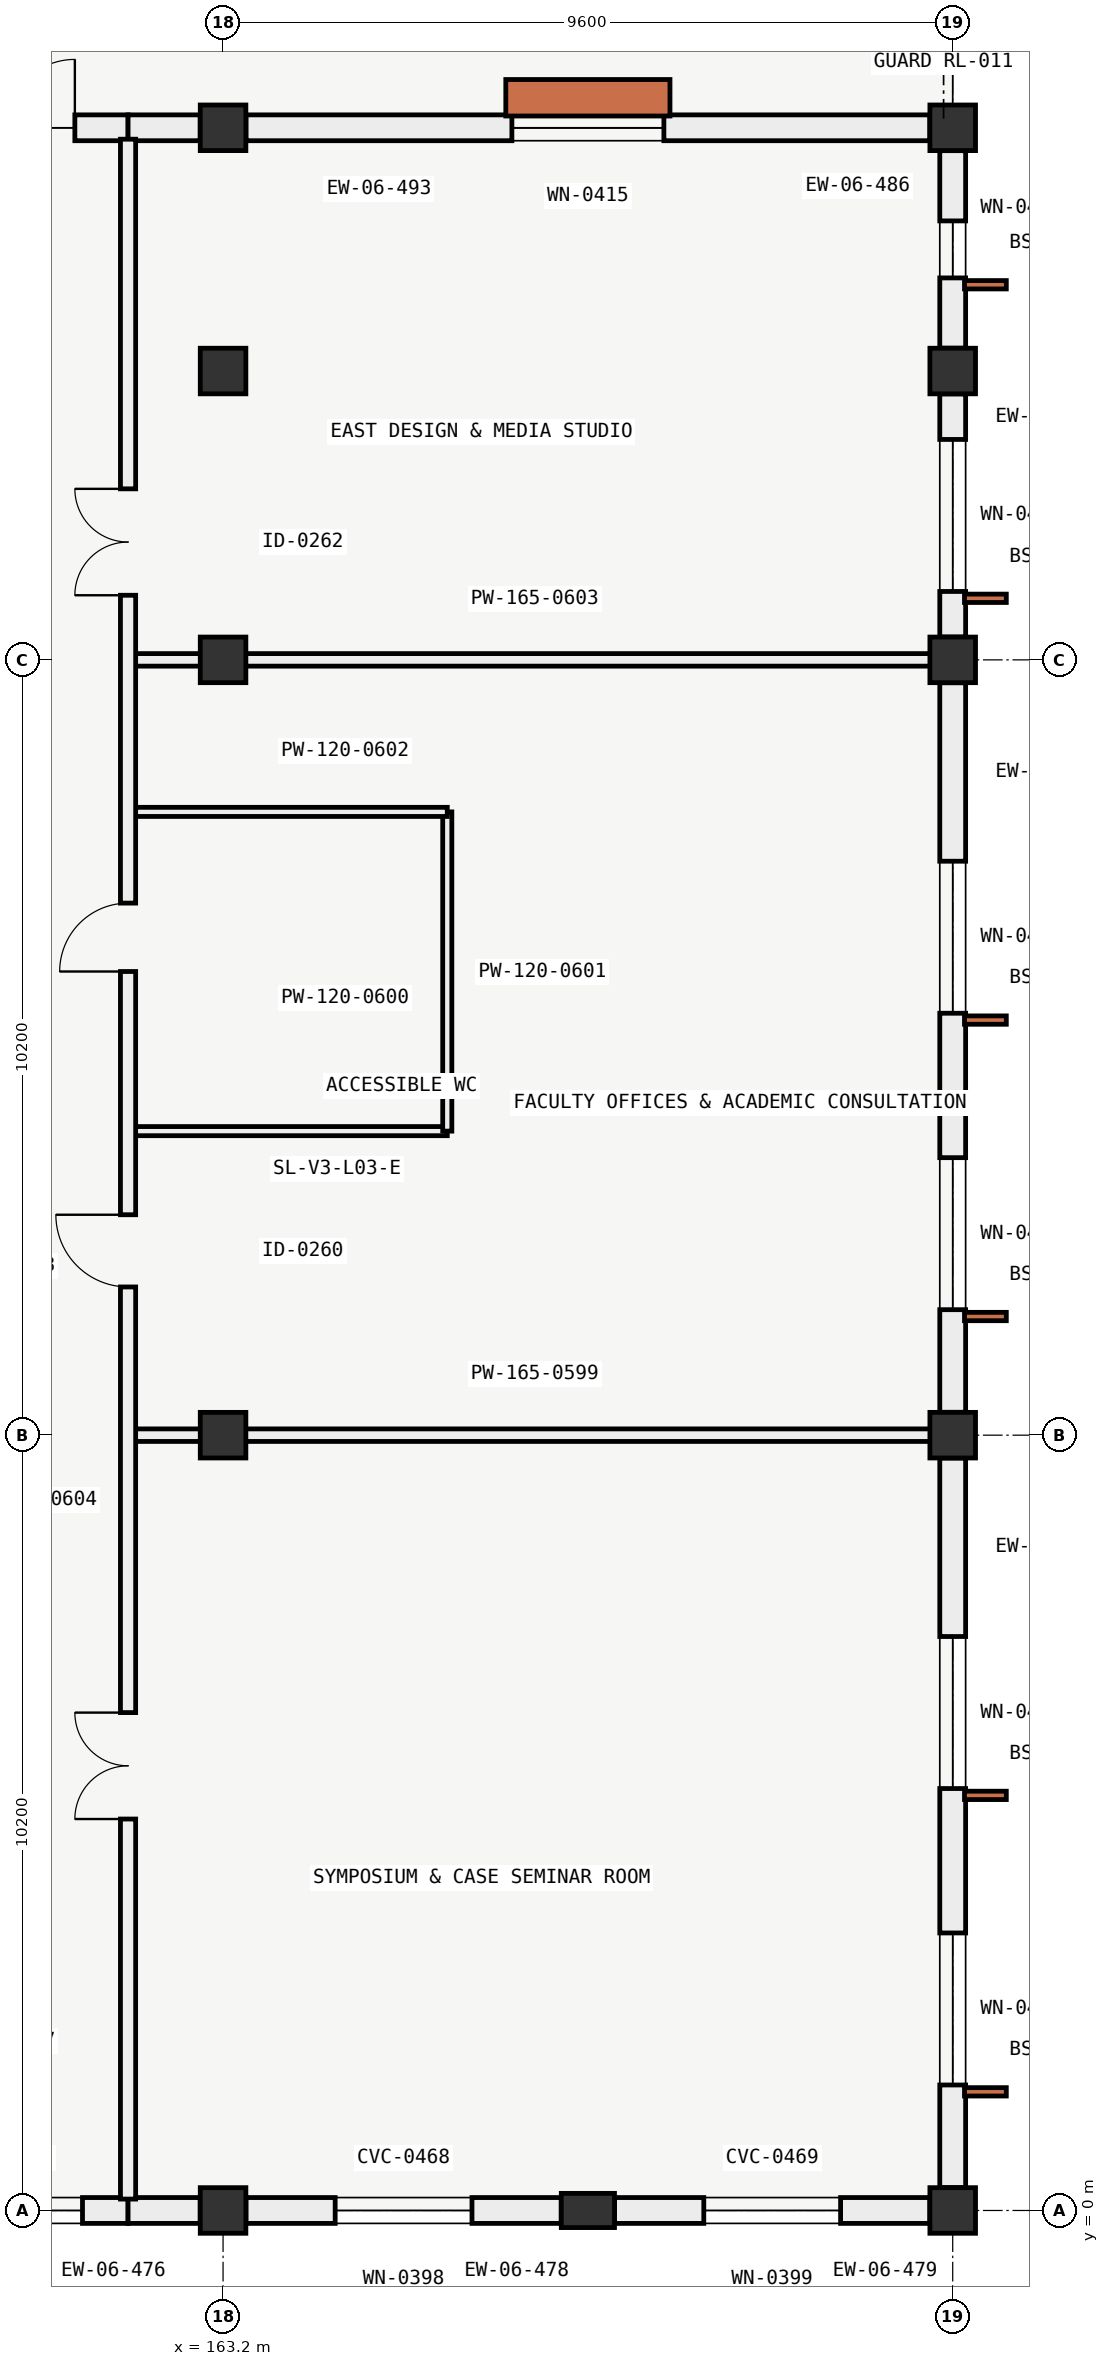
"""IFC4 building model, lengths in metres.
Left out: names, types, materials, properties, quantities, classifications, styles, units other than length and angle.
Written with IfcOpenShell. Run it as: python <this file> out.ifc"""

import sys

from ifc_helpers import new_model, si_unit, direction, frame, frame_2d, origin, origin_2d, place, context, subcontext, project, spatial, rectangle, extrude, element, fill, save


model = new_model("IFC4")
c1 = context("Model", 3, precision=1e-05, world=origin(), true_north=direction((0.0, 1.0)))
c2 = subcontext(c1, "Body", "Model", "MODEL_VIEW")
j1 = project(units=[si_unit("LENGTHUNIT", "METRE"), si_unit("PLANEANGLEUNIT", "RADIAN")], contexts=[c1])
p1 = place(None, origin())
s1 = spatial("IfcSite", under=j1, at=p1, CompositionType="ELEMENT")
p2 = place(p1, origin())
s2 = spatial("IfcBuilding", under=s1, at=p2, CompositionType="ELEMENT")
p3 = place(p2, frame((0.0, 0.0, 13.8)))
s3 = spatial("IfcBuildingStorey", under=s2, at=p3, CompositionType="ELEMENT", Elevation=13.8)
for number, where, z_axis, x_axis in (
    (1, (163.2, 0.0, 0.0), (0.0, 0.0, 1.0), (1.0, 0.0, 0.0)),
    (2, (163.2, 10.2, 0.0), (0.0, 0.0, 1.0), (1.0, 0.0, 0.0)),
    (3, (163.2, 20.4, 0.0), (0.0, 0.0, 1.0), (1.0, 0.0, 0.0)),
    (4, (163.2, 24.2, 0.0), (0.0, 0.0, 1.0), (1.0, 0.0, 0.0)),
    (5, (163.2, 27.4, 0.0), (0.0, 0.0, 1.0), (1.0, 0.0, 0.0)),
    (6, (172.8, 0.0, 0.0), (0.0, 0.0, 1.0), (1.0, 0.0, 0.0)),
    (7, (172.8, 10.2, 0.0), (0.0, 0.0, 1.0), (1.0, 0.0, 0.0)),
    (8, (172.8, 20.4, 0.0), (0.0, 0.0, 1.0), (1.0, 0.0, 0.0)),
    (9, (172.8, 24.2, 0.0), (0.0, 0.0, 1.0), (1.0, 0.0, 0.0)),
    (10, (172.8, 27.4, 0.0), (0.0, 0.0, 1.0), (1.0, 0.0, 0.0)),
):
    element("IfcColumn", number, at=place(p3, frame(where, z_axis=z_axis, x_axis=x_axis)), inside=s3, PredefinedType="COLUMN", context=c2, shape_type="SweptSolid", body=[
        extrude(rectangle(XDim=0.6, YDim=0.6, at=origin_2d()), origin(), (0.0, 0.0, 1.0), 4.2),
    ])
p4 = place(p3, frame((168.0, 0.0, 0.0), z_axis=(0.0, 0.0, 1.0), x_axis=(0.0, 1.0, 0.0)))
e11 = element("IfcColumn", 11, at=p4, inside=s3, PredefinedType="PILASTER", context=c2, shape_type="SweptSolid", body=[
    extrude(rectangle(XDim=0.45, YDim=0.7, at=origin_2d()), origin(), (0.0, 0.0, 1.0), 4.2),
])
p5 = place(p3, frame((161.95, 0.0, 0.0), z_axis=(0.0, 0.0, 1.0), x_axis=(-1.0, 0.0, 0.0)))
e12 = element("IfcWall", 12, at=p5, inside=s3, PredefinedType="SOLIDWALL", context=c2, shape_type="SweptSolid", body=[
    extrude(rectangle(XDim=3.199, YDim=0.34, at=frame_2d((1.6, 0.0))), origin(), (0.0, 0.0, 1.0), 3.28),
])
p6 = place(p5, frame((0.6, 0.0, 0.75)))
e13 = element("IfcOpeningElement", 13, at=p6, cuts=e12, PredefinedType="OPENING", context=c2, shape_type="SweptSolid", body=[
    extrude(rectangle(XDim=2.0, YDim=1.35, at=frame_2d((1.0, 0.675))), frame((0.0, 0.18, 0.0), z_axis=(0.0, -1.0, 0.0), x_axis=(1.0, 0.0, 0.0)), (0.0, 0.0, 1.0), 0.36),
])
p7 = place(p3, frame((162.899, 0.0, 0.0), z_axis=(0.0, 0.0, 1.0), x_axis=(-1.0, 0.0, 0.0)))
e14 = element("IfcWall", 14, at=p7, inside=s3, PredefinedType="SOLIDWALL", context=c2, shape_type="SweptSolid", body=[
    extrude(rectangle(XDim=0.949, YDim=0.34, at=frame_2d((0.475, 0.0))), origin(), (0.0, 0.0, 1.0), 3.28),
])
p8 = place(p3, frame((167.649, 0.0, 0.0), z_axis=(0.0, 0.0, 1.0), x_axis=(-1.0, 0.0, 0.0)))
e15 = element("IfcWall", 15, at=p8, inside=s3, PredefinedType="SOLIDWALL", context=c2, shape_type="SweptSolid", body=[
    extrude(rectangle(XDim=4.148, YDim=0.34, at=frame_2d((2.074, 0.0))), origin(), (0.0, 0.0, 1.0), 3.28),
])
p9 = place(p8, frame((1.174, 0.0, 0.85)))
e16 = element("IfcOpeningElement", 16, at=p9, cuts=e15, PredefinedType="OPENING", context=c2, shape_type="SweptSolid", body=[
    extrude(rectangle(XDim=1.8, YDim=2.1, at=frame_2d((0.9, 1.05))), frame((0.0, 0.18, 0.0), z_axis=(0.0, -1.0, 0.0), x_axis=(1.0, 0.0, 0.0)), (0.0, 0.0, 1.0), 0.36),
])
p10 = place(p3, frame((172.499, 0.0, 0.0), z_axis=(0.0, 0.0, 1.0), x_axis=(-1.0, 0.0, 0.0)))
e17 = element("IfcWall", 17, at=p10, inside=s3, PredefinedType="SOLIDWALL", context=c2, shape_type="SweptSolid", body=[
    extrude(rectangle(XDim=4.148, YDim=0.34, at=frame_2d((2.074, 0.0))), origin(), (0.0, 0.0, 1.0), 3.28),
])
p11 = place(p10, frame((1.174, 0.0, 0.85)))
e18 = element("IfcOpeningElement", 18, at=p11, cuts=e17, PredefinedType="OPENING", context=c2, shape_type="SweptSolid", body=[
    extrude(rectangle(XDim=1.8, YDim=2.1, at=frame_2d((0.9, 1.05))), frame((0.0, 0.18, 0.0), z_axis=(0.0, -1.0, 0.0), x_axis=(1.0, 0.0, 0.0)), (0.0, 0.0, 1.0), 0.36),
])
p12 = place(p3, frame((172.8, 9.899, 0.0), z_axis=(0.0, 0.0, 1.0), x_axis=(0.0, -1.0, 0.0)))
e19 = element("IfcWall", 19, at=p12, inside=s3, PredefinedType="SOLIDWALL", context=c2, shape_type="SweptSolid", body=[
    extrude(rectangle(XDim=9.598, YDim=0.34, at=frame_2d((4.799, 0.0))), origin(), (0.0, 0.0, 1.0), 3.28),
])
p13 = place(p12, frame((6.248, 0.0, 0.85)))
e20 = element("IfcOpeningElement", 20, at=p13, cuts=e19, PredefinedType="OPENING", context=c2, shape_type="SweptSolid", body=[
    extrude(rectangle(XDim=2.0, YDim=1.35, at=frame_2d((1.0, 0.675))), frame((0.0, 0.18, 0.0), z_axis=(0.0, -1.0, 0.0), x_axis=(1.0, 0.0, 0.0)), (0.0, 0.0, 1.0), 0.36),
])
p14 = place(p12, frame((2.348, 0.0, 0.85)))
e21 = element("IfcOpeningElement", 21, at=p14, cuts=e19, PredefinedType="OPENING", context=c2, shape_type="SweptSolid", body=[
    extrude(rectangle(XDim=2.0, YDim=1.35, at=frame_2d((1.0, 0.675))), frame((0.0, 0.18, 0.0), z_axis=(0.0, -1.0, 0.0), x_axis=(1.0, 0.0, 0.0)), (0.0, 0.0, 1.0), 0.36),
])
p15 = place(p3, frame((172.8, 20.099, 0.0), z_axis=(0.0, 0.0, 1.0), x_axis=(0.0, -1.0, 0.0)))
e22 = element("IfcWall", 22, at=p15, inside=s3, PredefinedType="SOLIDWALL", context=c2, shape_type="SweptSolid", body=[
    extrude(rectangle(XDim=9.598, YDim=0.34, at=frame_2d((4.799, 0.0))), origin(), (0.0, 0.0, 1.0), 3.28),
])
p16 = place(p15, frame((6.248, 0.0, 0.85)))
e23 = element("IfcOpeningElement", 23, at=p16, cuts=e22, PredefinedType="OPENING", context=c2, shape_type="SweptSolid", body=[
    extrude(rectangle(XDim=2.0, YDim=1.35, at=frame_2d((1.0, 0.675))), frame((0.0, 0.18, 0.0), z_axis=(0.0, -1.0, 0.0), x_axis=(1.0, 0.0, 0.0)), (0.0, 0.0, 1.0), 0.36),
])
p17 = place(p15, frame((2.348, 0.0, 0.85)))
e24 = element("IfcOpeningElement", 24, at=p17, cuts=e22, PredefinedType="OPENING", context=c2, shape_type="SweptSolid", body=[
    extrude(rectangle(XDim=2.0, YDim=1.35, at=frame_2d((1.0, 0.675))), frame((0.0, 0.18, 0.0), z_axis=(0.0, -1.0, 0.0), x_axis=(1.0, 0.0, 0.0)), (0.0, 0.0, 1.0), 0.36),
])
p18 = place(p3, frame((172.8, 27.099, 0.0), z_axis=(0.0, 0.0, 1.0), x_axis=(0.0, -1.0, 0.0)))
e25 = element("IfcWall", 25, at=p18, inside=s3, PredefinedType="SOLIDWALL", context=c2, shape_type="SweptSolid", body=[
    extrude(rectangle(XDim=2.598, YDim=0.34, at=frame_2d((1.299, 0.0))), origin(), (0.0, 0.0, 1.0), 3.28),
])
p19 = place(p18, frame((0.924, 0.0, 0.85)))
e26 = element("IfcOpeningElement", 26, at=p19, cuts=e25, PredefinedType="OPENING", context=c2, shape_type="SweptSolid", body=[
    extrude(rectangle(XDim=0.75, YDim=1.1, at=frame_2d((0.375, 0.55))), frame((0.0, 0.18, 0.0), z_axis=(0.0, -1.0, 0.0), x_axis=(1.0, 0.0, 0.0)), (0.0, 0.0, 1.0), 0.36),
])
p20 = place(p3, frame((172.8, 23.899, 0.0), z_axis=(0.0, 0.0, 1.0), x_axis=(0.0, -1.0, 0.0)))
e27 = element("IfcWall", 27, at=p20, inside=s3, PredefinedType="SOLIDWALL", context=c2, shape_type="SweptSolid", body=[
    extrude(rectangle(XDim=3.198, YDim=0.34, at=frame_2d((1.599, 0.0))), origin(), (0.0, 0.0, 1.0), 3.28),
])
p21 = place(p20, frame((0.599, 0.0, 0.85)))
e28 = element("IfcOpeningElement", 28, at=p21, cuts=e27, PredefinedType="OPENING", context=c2, shape_type="SweptSolid", body=[
    extrude(rectangle(XDim=2.0, YDim=1.35, at=frame_2d((1.0, 0.675))), frame((0.0, 0.18, 0.0), z_axis=(0.0, -1.0, 0.0), x_axis=(1.0, 0.0, 0.0)), (0.0, 0.0, 1.0), 0.36),
])
p22 = place(p3, frame((158.75, 27.4, 0.0), z_axis=(0.0, 0.0, 1.0), x_axis=(1.0, 0.0, 0.0)))
e29 = element("IfcWall", 29, at=p22, inside=s3, PredefinedType="SOLIDWALL", context=c2, shape_type="SweptSolid", body=[
    extrude(rectangle(XDim=3.2, YDim=0.34, at=frame_2d((1.6, 0.0))), origin(), (0.0, 0.0, 1.0), 3.28),
])
p23 = place(p22, frame((0.7, 0.0, 0.0)))
e30 = element("IfcOpeningElement", 30, at=p23, cuts=e29, PredefinedType="OPENING", context=c2, shape_type="SweptSolid", body=[
    extrude(rectangle(XDim=1.8, YDim=2.2, at=frame_2d((0.9, 1.1))), frame((0.0, 0.18, 0.0), z_axis=(0.0, -1.0, 0.0), x_axis=(1.0, 0.0, 0.0)), (0.0, 0.0, 1.0), 0.36),
])
p24 = place(p3, frame((161.95, 27.4, 0.0), z_axis=(0.0, 0.0, 1.0), x_axis=(1.0, 0.0, 0.0)))
e31 = element("IfcWall", 31, at=p24, inside=s3, PredefinedType="SOLIDWALL", context=c2, shape_type="SweptSolid", body=[
    extrude(rectangle(XDim=0.949, YDim=0.34, at=frame_2d((0.475, 0.0))), origin(), (0.0, 0.0, 1.0), 3.28),
])
p25 = place(p3, frame((163.501, 27.4, 0.0), z_axis=(0.0, 0.0, 1.0), x_axis=(1.0, 0.0, 0.0)))
e32 = element("IfcWall", 32, at=p25, inside=s3, PredefinedType="SOLIDWALL", context=c2, shape_type="SweptSolid", body=[
    extrude(rectangle(XDim=8.998, YDim=0.34, at=frame_2d((4.499, 0.0))), origin(), (0.0, 0.0, 1.0), 3.28),
])
p26 = place(p25, frame((3.499, 0.0, 0.85)))
e33 = element("IfcOpeningElement", 33, at=p26, cuts=e32, PredefinedType="OPENING", context=c2, shape_type="SweptSolid", body=[
    extrude(rectangle(XDim=2.0, YDim=1.35, at=frame_2d((1.0, 0.675))), frame((0.0, 0.18, 0.0), z_axis=(0.0, -1.0, 0.0), x_axis=(1.0, 0.0, 0.0)), (0.0, 0.0, 1.0), 0.36),
])
p27 = place(p3, frame((161.95, 10.2, 0.0), z_axis=(0.0, 0.0, 1.0), x_axis=(1.0, 0.0, 0.0)))
e34 = element("IfcWall", 34, at=p27, inside=s3, PredefinedType="PARTITIONING", context=c2, shape_type="SweptSolid", body=[
    extrude(rectangle(XDim=10.7, YDim=0.165, at=frame_2d((5.35, 0.0))), origin(), (0.0, 0.0, 1.0), 3.23),
])
p28 = place(p3, frame((161.95, 14.2, 0.0), z_axis=(0.0, 0.0, 1.0), x_axis=(1.0, 0.0, 0.0)))
e35 = element("IfcWall", 35, at=p28, inside=s3, PredefinedType="PARTITIONING", context=c2, shape_type="SweptSolid", body=[
    extrude(rectangle(XDim=4.2, YDim=0.12, at=frame_2d((2.1, 0.0))), origin(), (0.0, 0.0, 1.0), 3.28),
])
p29 = place(p3, frame((166.15, 14.2, 0.0), z_axis=(0.0, 0.0, 1.0), x_axis=(0.0, 1.0, 0.0)))
e36 = element("IfcWall", 36, at=p29, inside=s3, PredefinedType="PARTITIONING", context=c2, shape_type="SweptSolid", body=[
    extrude(rectangle(XDim=4.2, YDim=0.12, at=frame_2d((2.1, 0.0))), origin(), (0.0, 0.0, 1.0), 3.85),
])
p30 = place(p3, frame((161.95, 18.4, 0.0), z_axis=(0.0, 0.0, 1.0), x_axis=(1.0, 0.0, 0.0)))
e37 = element("IfcWall", 37, at=p30, inside=s3, PredefinedType="PARTITIONING", context=c2, shape_type="SweptSolid", body=[
    extrude(rectangle(XDim=4.2, YDim=0.12, at=frame_2d((2.1, 0.0))), origin(), (0.0, 0.0, 1.0), 3.28),
])
p31 = place(p3, frame((161.95, 20.4, 0.0), z_axis=(0.0, 0.0, 1.0), x_axis=(1.0, 0.0, 0.0)))
e38 = element("IfcWall", 38, at=p31, inside=s3, PredefinedType="PARTITIONING", context=c2, shape_type="SweptSolid", body=[
    extrude(rectangle(XDim=10.7, YDim=0.165, at=frame_2d((5.35, 0.0))), origin(), (0.0, 0.0, 1.0), 3.23),
])
p32 = place(p3, frame((161.95, 0.15, 0.0), z_axis=(0.0, 0.0, 1.0), x_axis=(0.0, 1.0, 0.0)))
e39 = element("IfcWall", 39, at=p32, inside=s3, PredefinedType="PARTITIONING", context=c2, shape_type="SweptSolid", body=[
    extrude(rectangle(XDim=27.1, YDim=0.2, at=frame_2d((13.55, 0.0))), origin(), (0.0, 0.0, 1.0), 3.23),
])
p33 = place(p32, frame((5.0, 0.0, 0.0)))
e40 = element("IfcOpeningElement", 40, at=p33, cuts=e39, PredefinedType="OPENING", context=c2, shape_type="SweptSolid", body=[
    extrude(rectangle(XDim=1.4, YDim=2.2, at=frame_2d((0.7, 1.1))), frame((0.0, 0.11, 0.0), z_axis=(0.0, -1.0, 0.0), x_axis=(1.0, 0.0, 0.0)), (0.0, 0.0, 1.0), 0.22),
])
p34 = place(p32, frame((12.0, 0.0, 0.0)))
e41 = element("IfcOpeningElement", 41, at=p34, cuts=e39, PredefinedType="OPENING", context=c2, shape_type="SweptSolid", body=[
    extrude(rectangle(XDim=0.95, YDim=2.1, at=frame_2d((0.475, 1.05))), frame((0.0, 0.11, 0.0), z_axis=(0.0, -1.0, 0.0), x_axis=(1.0, 0.0, 0.0)), (0.0, 0.0, 1.0), 0.22),
])
p35 = place(p32, frame((16.15, 0.0, 0.0)))
e42 = element("IfcOpeningElement", 42, at=p35, cuts=e39, PredefinedType="OPENING", context=c2, shape_type="SweptSolid", body=[
    extrude(rectangle(XDim=0.9, YDim=2.05, at=frame_2d((0.45, 1.025))), frame((0.0, 0.11, 0.0), z_axis=(0.0, -1.0, 0.0), x_axis=(1.0, 0.0, 0.0)), (0.0, 0.0, 1.0), 0.22),
])
p36 = place(p32, frame((21.1, 0.0, 0.0)))
e43 = element("IfcOpeningElement", 43, at=p36, cuts=e39, PredefinedType="OPENING", context=c2, shape_type="SweptSolid", body=[
    extrude(rectangle(XDim=1.4, YDim=2.2, at=frame_2d((0.7, 1.1))), frame((0.0, 0.11, 0.0), z_axis=(0.0, -1.0, 0.0), x_axis=(1.0, 0.0, 0.0)), (0.0, 0.0, 1.0), 0.22),
])
p37 = place(p6, origin())
e44 = element("IfcWindow", 44, at=p37, inside=s3, PartitioningType="SINGLE_PANEL", PredefinedType="WINDOW", context=c2, shape_type="SweptSolid", body=[
    extrude(rectangle(XDim=2.0, YDim=1.35, at=frame_2d((1.0, 0.675))), frame((0.0, 0.03, 0.0), z_axis=(0.0, -1.0, 0.0), x_axis=(1.0, 0.0, 0.0)), (0.0, 0.0, 1.0), 0.06),
])
fill(e13, e44)
p38 = place(p9, origin())
e45 = element("IfcWindow", 45, at=p38, inside=s3, PartitioningType="SINGLE_PANEL", PredefinedType="WINDOW", context=c2, shape_type="SweptSolid", body=[
    extrude(rectangle(XDim=1.8, YDim=2.1, at=frame_2d((0.9, 1.05))), frame((0.0, 0.03, 0.0), z_axis=(0.0, -1.0, 0.0), x_axis=(1.0, 0.0, 0.0)), (0.0, 0.0, 1.0), 0.06),
])
fill(e16, e45)
p39 = place(p11, origin())
e46 = element("IfcWindow", 46, at=p39, inside=s3, PartitioningType="SINGLE_PANEL", PredefinedType="WINDOW", context=c2, shape_type="SweptSolid", body=[
    extrude(rectangle(XDim=1.8, YDim=2.1, at=frame_2d((0.9, 1.05))), frame((0.0, 0.03, 0.0), z_axis=(0.0, -1.0, 0.0), x_axis=(1.0, 0.0, 0.0)), (0.0, 0.0, 1.0), 0.06),
])
fill(e18, e46)
p40 = place(p13, origin())
e47 = element("IfcWindow", 47, at=p40, inside=s3, PartitioningType="SINGLE_PANEL", PredefinedType="WINDOW", context=c2, shape_type="SweptSolid", body=[
    extrude(rectangle(XDim=2.0, YDim=1.35, at=frame_2d((1.0, 0.675))), frame((0.0, 0.03, 0.0), z_axis=(0.0, -1.0, 0.0), x_axis=(1.0, 0.0, 0.0)), (0.0, 0.0, 1.0), 0.06),
])
fill(e20, e47)
p41 = place(p14, origin())
e48 = element("IfcWindow", 48, at=p41, inside=s3, PartitioningType="SINGLE_PANEL", PredefinedType="WINDOW", context=c2, shape_type="SweptSolid", body=[
    extrude(rectangle(XDim=2.0, YDim=1.35, at=frame_2d((1.0, 0.675))), frame((0.0, 0.03, 0.0), z_axis=(0.0, -1.0, 0.0), x_axis=(1.0, 0.0, 0.0)), (0.0, 0.0, 1.0), 0.06),
])
fill(e21, e48)
p42 = place(p16, origin())
e49 = element("IfcWindow", 49, at=p42, inside=s3, PartitioningType="SINGLE_PANEL", PredefinedType="WINDOW", context=c2, shape_type="SweptSolid", body=[
    extrude(rectangle(XDim=2.0, YDim=1.35, at=frame_2d((1.0, 0.675))), frame((0.0, 0.03, 0.0), z_axis=(0.0, -1.0, 0.0), x_axis=(1.0, 0.0, 0.0)), (0.0, 0.0, 1.0), 0.06),
])
fill(e23, e49)
p43 = place(p17, origin())
e50 = element("IfcWindow", 50, at=p43, inside=s3, PartitioningType="SINGLE_PANEL", PredefinedType="WINDOW", context=c2, shape_type="SweptSolid", body=[
    extrude(rectangle(XDim=2.0, YDim=1.35, at=frame_2d((1.0, 0.675))), frame((0.0, 0.03, 0.0), z_axis=(0.0, -1.0, 0.0), x_axis=(1.0, 0.0, 0.0)), (0.0, 0.0, 1.0), 0.06),
])
fill(e24, e50)
p44 = place(p19, origin())
e51 = element("IfcWindow", 51, at=p44, inside=s3, PartitioningType="SINGLE_PANEL", PredefinedType="WINDOW", context=c2, shape_type="SweptSolid", body=[
    extrude(rectangle(XDim=0.75, YDim=1.1, at=frame_2d((0.375, 0.55))), frame((0.0, 0.03, 0.0), z_axis=(0.0, -1.0, 0.0), x_axis=(1.0, 0.0, 0.0)), (0.0, 0.0, 1.0), 0.06),
])
fill(e26, e51)
p45 = place(p21, origin())
e52 = element("IfcWindow", 52, at=p45, inside=s3, PartitioningType="SINGLE_PANEL", PredefinedType="WINDOW", context=c2, shape_type="SweptSolid", body=[
    extrude(rectangle(XDim=2.0, YDim=1.35, at=frame_2d((1.0, 0.675))), frame((0.0, 0.03, 0.0), z_axis=(0.0, -1.0, 0.0), x_axis=(1.0, 0.0, 0.0)), (0.0, 0.0, 1.0), 0.06),
])
fill(e28, e52)
p46 = place(p23, origin())
e53 = element("IfcDoor", 53, at=p46, inside=s3, OperationType="DOUBLE_DOOR_SINGLE_SWING", PredefinedType="DOOR", context=c2, shape_type="SweptSolid", body=[
    extrude(rectangle(XDim=1.8, YDim=2.2, at=frame_2d((0.9, 1.1))), frame((0.0, 0.025, 0.0), z_axis=(0.0, -1.0, 0.0), x_axis=(1.0, 0.0, 0.0)), (0.0, 0.0, 1.0), 0.05),
])
fill(e30, e53)
p47 = place(p26, origin())
e54 = element("IfcWindow", 54, at=p47, inside=s3, PartitioningType="SINGLE_PANEL", PredefinedType="WINDOW", context=c2, shape_type="SweptSolid", body=[
    extrude(rectangle(XDim=2.0, YDim=1.35, at=frame_2d((1.0, 0.675))), frame((0.0, 0.03, 0.0), z_axis=(0.0, -1.0, 0.0), x_axis=(1.0, 0.0, 0.0)), (0.0, 0.0, 1.0), 0.06),
])
fill(e33, e54)
p48 = place(p33, origin())
e55 = element("IfcDoor", 55, at=p48, inside=s3, OperationType="DOUBLE_DOOR_SINGLE_SWING", PredefinedType="DOOR", context=c2, shape_type="SweptSolid", body=[
    extrude(rectangle(XDim=1.4, YDim=2.2, at=frame_2d((0.7, 1.1))), frame((0.0, 0.025, 0.0), z_axis=(0.0, -1.0, 0.0), x_axis=(1.0, 0.0, 0.0)), (0.0, 0.0, 1.0), 0.05),
])
fill(e40, e55)
p49 = place(p34, origin())
e56 = element("IfcDoor", 56, at=p49, inside=s3, OperationType="SINGLE_SWING_RIGHT", PredefinedType="DOOR", context=c2, shape_type="SweptSolid", body=[
    extrude(rectangle(XDim=0.95, YDim=2.1, at=frame_2d((0.475, 1.05))), frame((0.0, 0.025, 0.0), z_axis=(0.0, -1.0, 0.0), x_axis=(1.0, 0.0, 0.0)), (0.0, 0.0, 1.0), 0.05),
])
fill(e41, e56)
p50 = place(p35, origin())
e57 = element("IfcDoor", 57, at=p50, inside=s3, OperationType="SINGLE_SWING_LEFT", PredefinedType="DOOR", context=c2, shape_type="SweptSolid", body=[
    extrude(rectangle(XDim=0.9, YDim=2.05, at=frame_2d((0.45, 1.025))), frame((0.0, 0.025, 0.0), z_axis=(0.0, -1.0, 0.0), x_axis=(1.0, 0.0, 0.0)), (0.0, 0.0, 1.0), 0.05),
])
fill(e42, e57)
p51 = place(p36, origin())
e58 = element("IfcDoor", 58, at=p51, inside=s3, OperationType="DOUBLE_DOOR_SINGLE_SWING", PredefinedType="DOOR", context=c2, shape_type="SweptSolid", body=[
    extrude(rectangle(XDim=1.4, YDim=2.2, at=frame_2d((0.7, 1.1))), frame((0.0, 0.025, 0.0), z_axis=(0.0, -1.0, 0.0), x_axis=(1.0, 0.0, 0.0)), (0.0, 0.0, 1.0), 0.05),
])
fill(e43, e58)
save(model, sys.argv[1])
